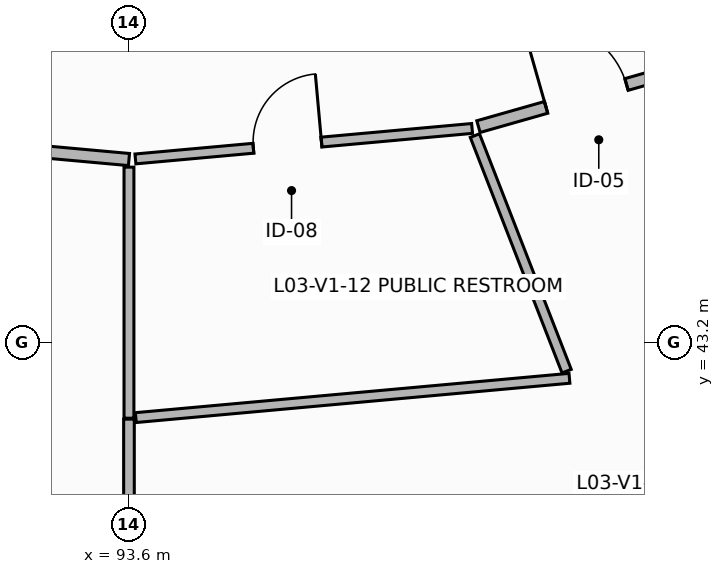
"""IFC4 building model, lengths in metres.
Left out: names, types, materials, properties, quantities, classifications, styles, units other than length and angle.
Written with IfcOpenShell. Run it as: python <this file> out.ifc"""

import sys

from ifc_helpers import new_model, si_unit, direction, frame, frame_2d, origin, place, context, subcontext, project, spatial, rectangle, extrude, element, fill, save


model = new_model("IFC4")
c1 = context("Model", 3, precision=1e-05, world=origin(), true_north=direction((0.0, 1.0)))
c2 = subcontext(c1, "Body", "Model", "MODEL_VIEW")
j1 = project(units=[si_unit("LENGTHUNIT", "METRE"), si_unit("PLANEANGLEUNIT", "RADIAN")], contexts=[c1])
p1 = place(None, origin())
s1 = spatial("IfcSite", under=j1, at=p1, CompositionType="ELEMENT")
p2 = place(p1, origin())
s2 = spatial("IfcBuilding", under=s1, at=p2, CompositionType="ELEMENT")
p3 = place(p2, frame((0.0, 0.0, 12.3)))
s3 = spatial("IfcBuildingStorey", under=s2, at=p3, CompositionType="ELEMENT", Elevation=12.3)
p4 = place(p3, frame((89.098, 46.018, 0.0), z_axis=(0.0, 0.0, 1.0), x_axis=(0.995919723809, -0.090243579984, 0.0)))
e1 = element("IfcWall", 1, at=p4, inside=s3, PredefinedType="PARTITIONING", context=c2, shape_type="SweptSolid", body=[
    extrude(rectangle(XDim=4.521, YDim=0.16, at=frame_2d((2.26, 0.0))), origin(), (0.0, 0.0, 1.0), 2.82),
])
p5 = place(p4, frame((1.822, 0.0, 0.0)))
e2 = element("IfcOpeningElement", 2, at=p5, cuts=e1, PredefinedType="OPENING", context=c2, shape_type="SweptSolid", body=[
    extrude(rectangle(XDim=1.1, YDim=2.2, at=frame_2d((0.55, 1.1))), frame((0.0, 0.09, 0.0), z_axis=(0.0, -1.0, 0.0), x_axis=(1.0, 0.0, 0.0)), (0.0, 0.0, 1.0), 0.18),
])
p6 = place(p3, frame((93.6, 45.51, 0.0), z_axis=(0.0, 0.0, 1.0), x_axis=(0.0, -1.0, 0.0)))
e3 = element("IfcWall", 3, at=p6, inside=s3, PredefinedType="PARTITIONING", context=c2, shape_type="SweptSolid", body=[
    extrude(rectangle(XDim=3.303, YDim=0.13, at=frame_2d((1.651, 0.0))), origin(), (0.0, 0.0, 1.0), 2.82),
])
p7 = place(p3, frame((93.6, 42.195, 0.0), z_axis=(0.0, 0.0, 1.0), x_axis=(0.0, -1.0, 0.0)))
e4 = element("IfcWall", 4, at=p7, inside=s3, PredefinedType="PARTITIONING", context=c2, shape_type="SweptSolid", body=[
    extrude(rectangle(XDim=6.26, YDim=0.14, at=frame_2d((3.13, 0.0))), origin(), (0.0, 0.0, 1.0), 2.82),
])
p8 = place(p3, frame((99.395, 42.732, 0.0), z_axis=(0.0, 0.0, 1.0), x_axis=(-0.995921454067, -0.090224482979, 0.0)))
e5 = element("IfcWall", 5, at=p8, inside=s3, PredefinedType="PARTITIONING", context=c2, shape_type="SweptSolid", body=[
    extrude(rectangle(XDim=5.729, YDim=0.13, at=frame_2d((2.864, 0.0))), origin(), (0.0, 0.0, 1.0), 2.82),
])
p9 = place(p3, frame((93.685, 45.618, 0.0), z_axis=(0.0, 0.0, 1.0), x_axis=(0.995923749059, 0.090199146668, 0.0)))
e6 = element("IfcWall", 6, at=p9, inside=s3, PredefinedType="PARTITIONING", context=c2, shape_type="SweptSolid", body=[
    extrude(rectangle(XDim=4.447, YDim=0.13, at=frame_2d((2.224, 0.0))), origin(), (0.0, 0.0, 1.0), 2.82),
])
p10 = place(p9, frame((1.558, 0.0, 0.0)))
e7 = element("IfcOpeningElement", 7, at=p10, cuts=e6, PredefinedType="OPENING", context=c2, shape_type="SweptSolid", body=[
    extrude(rectangle(XDim=0.9, YDim=2.1, at=frame_2d((0.45, 1.05))), frame((0.0, 0.075, 0.0), z_axis=(0.0, -1.0, 0.0), x_axis=(1.0, 0.0, 0.0)), (0.0, 0.0, 1.0), 0.15),
])
p11 = place(p3, frame((98.151, 45.925, 0.0), z_axis=(0.0, 0.0, 1.0), x_axis=(0.362920895293, -0.931819952437, 0.0)))
e8 = element("IfcWall", 8, at=p11, inside=s3, PredefinedType="PARTITIONING", context=c2, shape_type="SweptSolid", body=[
    extrude(rectangle(XDim=3.326, YDim=0.13, at=frame_2d((1.663, 0.0))), origin(), (0.0, 0.0, 1.0), 2.82),
])
p12 = place(p3, frame((98.198, 46.043, 0.0), z_axis=(0.0, 0.0, 1.0), x_axis=(0.961809330403, 0.273720317021, 0.0)))
e9 = element("IfcWall", 9, at=p12, inside=s3, PredefinedType="PARTITIONING", context=c2, shape_type="SweptSolid", body=[
    extrude(rectangle(XDim=4.286, YDim=0.16, at=frame_2d((2.143, 0.0))), origin(), (0.0, 0.0, 1.0), 2.82),
])
p13 = place(p12, frame((0.925, 0.0, 0.0)))
e10 = element("IfcOpeningElement", 10, at=p13, cuts=e9, PredefinedType="OPENING", context=c2, shape_type="SweptSolid", body=[
    extrude(rectangle(XDim=1.1, YDim=2.2, at=frame_2d((0.55, 1.1))), frame((0.0, 0.09, 0.0), z_axis=(0.0, -1.0, 0.0), x_axis=(1.0, 0.0, 0.0)), (0.0, 0.0, 1.0), 0.18),
])
p14 = place(p10, origin())
e11 = element("IfcDoor", 11, at=p14, inside=s3, OperationType="SINGLE_SWING_RIGHT", PredefinedType="DOOR", context=c2, shape_type="SweptSolid", body=[
    extrude(rectangle(XDim=0.9, YDim=2.1, at=frame_2d((0.45, 1.05))), frame((0.0, 0.025, 0.0), z_axis=(0.0, -1.0, 0.0), x_axis=(1.0, 0.0, 0.0)), (0.0, 0.0, 1.0), 0.05),
])
fill(e7, e11)
p15 = place(p13, origin())
e12 = element("IfcDoor", 12, at=p15, inside=s3, OperationType="SINGLE_SWING_LEFT", PredefinedType="DOOR", context=c2, shape_type="SweptSolid", body=[
    extrude(rectangle(XDim=1.1, YDim=2.2, at=frame_2d((0.55, 1.1))), frame((0.0, 0.025, 0.0), z_axis=(0.0, -1.0, 0.0), x_axis=(1.0, 0.0, 0.0)), (0.0, 0.0, 1.0), 0.05),
])
fill(e10, e12)
save(model, sys.argv[1])
